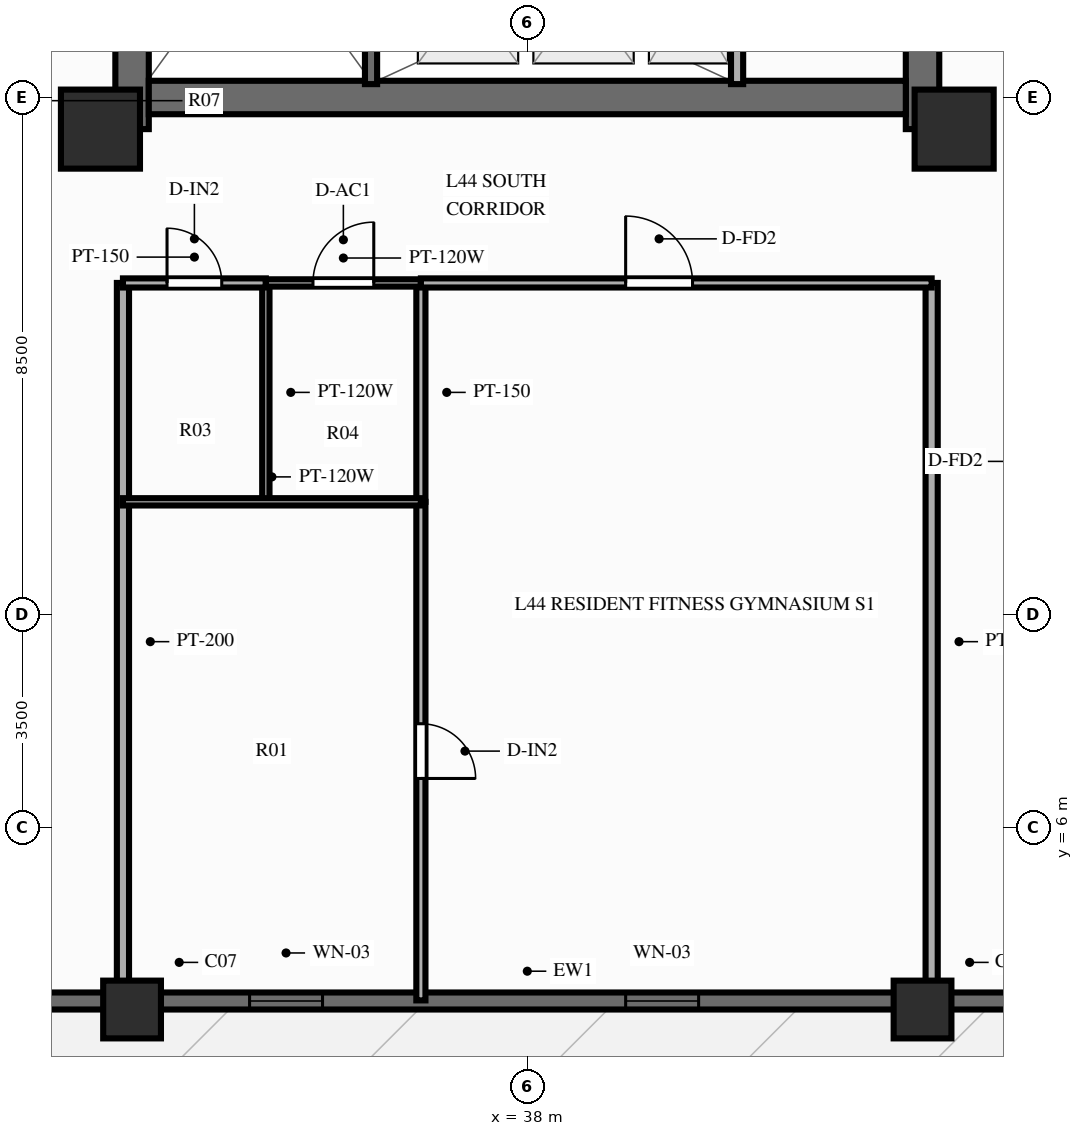
"""IFC4 building model, lengths in metres.
Left out: names, types, materials, properties, quantities, classifications, styles, units other than length and angle.
Written with IfcOpenShell. Run it as: python <this file> out.ifc"""

import sys

from ifc_helpers import new_model, si_unit, direction, frame, frame_2d, origin, origin_2d, place, context, subcontext, project, spatial, rectangle, extrude, source, transform, mapped, element, fill, save


model = new_model("IFC4")
c1 = context("Model", 3, precision=1e-05, world=origin(), true_north=direction((0.0, 1.0)))
c2 = subcontext(c1, "Body", "Model", "MODEL_VIEW")
j1 = project(units=[si_unit("LENGTHUNIT", "METRE"), si_unit("PLANEANGLEUNIT", "RADIAN")], contexts=[c1])
p1 = place(None, origin())
s1 = spatial("IfcSite", under=j1, at=p1, CompositionType="ELEMENT")
p2 = place(p1, origin())
s2 = spatial("IfcBuilding", under=s1, at=p2, CompositionType="ELEMENT")
p3 = place(p2, frame((0.0, 0.0, 138.75)))
s3 = spatial("IfcBuildingStorey", under=s2, at=p3, CompositionType="ELEMENT", Elevation=138.75)
p4 = place(p3, frame((31.5, 17.48, 0.0), z_axis=(0.0, 0.0, 1.0), x_axis=(0.0, 1.0, 0.0)))
e1 = element("IfcWall", 1, at=p4, inside=s3, PredefinedType="SHEAR", context=c2, shape_type="SweptSolid", body=[
    extrude(rectangle(XDim=19.04, YDim=0.55, at=frame_2d((9.52, 0.0))), origin(), (0.0, 0.0, 1.0), 3.0),
])
p5 = place(p4, frame((6.32, 0.0, 0.0)))
e2 = element("IfcOpeningElement", 2, at=p5, cuts=e1, PredefinedType="OPENING", context=c2, shape_type="SweptSolid", body=[
    extrude(rectangle(XDim=1.1, YDim=2.15, at=frame_2d((0.55, 1.075))), frame((0.0, 0.287, 0.0), z_axis=(0.0, -1.0, 0.0), x_axis=(1.0, 0.0, 0.0)), (0.0, 0.0, 1.0), 0.574),
])
p6 = place(p3, frame((44.5, 17.48, 0.0), z_axis=(0.0, 0.0, 1.0), x_axis=(0.0, 1.0, 0.0)))
e3 = element("IfcWall", 3, at=p6, inside=s3, PredefinedType="SHEAR", context=c2, shape_type="SweptSolid", body=[
    extrude(rectangle(XDim=19.04, YDim=0.55, at=frame_2d((9.52, 0.0))), origin(), (0.0, 0.0, 1.0), 3.0),
])
p7 = place(p6, frame((12.67, 0.0, 0.0), z_axis=(0.0, 0.0, 1.0), x_axis=(-1.0, 0.0, 0.0)))
e4 = element("IfcOpeningElement", 4, at=p7, cuts=e3, PredefinedType="OPENING", context=c2, shape_type="SweptSolid", body=[
    extrude(rectangle(XDim=1.1, YDim=2.15, at=frame_2d((0.55, 1.075))), frame((0.0, 0.287, 0.0), z_axis=(0.0, -1.0, 0.0), x_axis=(1.0, 0.0, 0.0)), (0.0, 0.0, 1.0), 0.574),
])
p8 = place(p3, frame((31.775, 18.0, 0.0), z_axis=(0.0, 0.0, 1.0), x_axis=(1.0, 0.0, 0.0)))
e5 = element("IfcWall", 5, at=p8, inside=s3, PredefinedType="SHEAR", context=c2, shape_type="SweptSolid", body=[
    extrude(rectangle(XDim=12.45, YDim=0.55, at=frame_2d((6.225, 0.0))), origin(), (0.0, 0.0, 1.0), 3.0),
])
m1 = source(origin(), c2, "Body", "SweptSolid", [
    extrude(rectangle(XDim=1.3, YDim=1.3, at=origin_2d()), origin(), (0.0, 0.0, 1.0), 3.0),
])
for number, where, z_axis, x_axis in (
    (6, (30.98, 17.48, 0.0), (0.0, 0.0, 1.0), (1.0, 0.0, 0.0)),
    (7, (45.02, 17.48, 0.0), (0.0, 0.0, 1.0), (1.0, 0.0, 0.0)),
):
    element("IfcColumn", number, at=place(p3, frame(where, z_axis=z_axis, x_axis=x_axis)), inside=s3, PredefinedType="COLUMN", context=c2, shape_type="MappedRepresentation", body=[
        mapped(m1, transform((0.0, 0.0, 0.0), scale=1.0)),
    ])
m2 = source(origin(), c2, "Body", "SweptSolid", [
    extrude(rectangle(XDim=0.95, YDim=0.95, at=origin_2d()), origin(), (0.0, 0.0, 1.0), 3.0),
])
for number, where, z_axis, x_axis in (
    (8, (31.5, 3.0, 0.0), (0.0, 0.0, 1.0), (1.0, 0.0, 0.0)),
    (9, (44.5, 3.0, 0.0), (0.0, 0.0, 1.0), (1.0, 0.0, 0.0)),
):
    element("IfcColumn", number, at=place(p3, frame(where, z_axis=z_axis, x_axis=x_axis)), inside=s3, PredefinedType="COLUMN", context=c2, shape_type="MappedRepresentation", body=[
        mapped(m2, transform((0.0, 0.0, 0.0), scale=1.0)),
    ])
p9 = place(p3, frame((16.2, 3.14, 0.0), z_axis=(0.0, 0.0, 1.0), x_axis=(1.0, 0.0, 0.0)))
e10 = element("IfcWall", 10, at=p9, inside=s3, PredefinedType="SOLIDWALL", context=c2, shape_type="SweptSolid", body=[
    extrude(rectangle(XDim=43.6, YDim=0.28, at=frame_2d((21.8, 0.0))), origin(), (0.0, 0.0, 1.0), 2.28),
])
p10 = place(p9, frame((8.2, 0.0, 0.0), z_axis=(0.0, 0.0, 1.0), x_axis=(-1.0, 0.0, 0.0)))
e11 = element("IfcOpeningElement", 11, at=p10, cuts=e10, PredefinedType="OPENING", context=c2, shape_type="SweptSolid", body=[
    extrude(rectangle(XDim=1.1, YDim=2.15, at=frame_2d((0.55, 1.075))), frame((0.0, 0.152, 0.0), z_axis=(0.0, -1.0, 0.0), x_axis=(1.0, 0.0, 0.0)), (0.0, 0.0, 1.0), 0.304),
])
p11 = place(p9, frame((17.232, 0.0, 0.25)))
e12 = element("IfcOpeningElement", 12, at=p11, cuts=e10, PredefinedType="OPENING", context=c2, shape_type="SweptSolid", body=[
    extrude(rectangle(XDim=1.2, YDim=1.5, at=frame_2d((0.6, 0.75))), frame((0.0, 0.152, 0.0), z_axis=(0.0, -1.0, 0.0), x_axis=(1.0, 0.0, 0.0)), (0.0, 0.0, 1.0), 0.304),
])
p12 = place(p9, frame((23.417, 0.0, 0.25)))
e13 = element("IfcOpeningElement", 13, at=p12, cuts=e10, PredefinedType="OPENING", context=c2, shape_type="SweptSolid", body=[
    extrude(rectangle(XDim=1.2, YDim=1.5, at=frame_2d((0.6, 0.75))), frame((0.0, 0.152, 0.0), z_axis=(0.0, -1.0, 0.0), x_axis=(1.0, 0.0, 0.0)), (0.0, 0.0, 1.0), 0.304),
])
p13 = place(p9, frame((35.35, 0.0, 0.25)))
e14 = element("IfcOpeningElement", 14, at=p13, cuts=e10, PredefinedType="OPENING", context=c2, shape_type="SweptSolid", body=[
    extrude(rectangle(XDim=1.2, YDim=1.5, at=frame_2d((0.6, 0.75))), frame((0.0, 0.152, 0.0), z_axis=(0.0, -1.0, 0.0), x_axis=(1.0, 0.0, 0.0)), (0.0, 0.0, 1.0), 0.304),
])
p14 = place(p3, frame((41.45, 18.22, 0.0), z_axis=(0.0, 0.0, 1.0), x_axis=(0.0, 1.0, 0.0)))
e15 = element("IfcWall", 15, at=p14, inside=s3, PredefinedType="PARTITIONING", context=c2, shape_type="SweptSolid", body=[
    extrude(rectangle(XDim=2.96, YDim=0.2, at=frame_2d((1.48, 0.0))), origin(), (0.0, 0.0, 1.0), 2.79),
])
p15 = place(p3, frame((35.43, 18.22, 0.0), z_axis=(0.0, 0.0, 1.0), x_axis=(0.0, 1.0, 0.0)))
e16 = element("IfcWall", 16, at=p15, inside=s3, PredefinedType="SOLIDWALL", context=c2, shape_type="SweptSolid", body=[
    extrude(rectangle(XDim=7.22, YDim=0.2, at=frame_2d((3.61, 0.0))), origin(), (0.0, 0.0, 1.0), 2.79),
])
p16 = place(p15, frame((6.68, 0.0, 0.0), z_axis=(0.0, 0.0, 1.0), x_axis=(-1.0, 0.0, 0.0)))
e17 = element("IfcOpeningElement", 17, at=p16, cuts=e16, PredefinedType="OPENING", context=c2, shape_type="SweptSolid", body=[
    extrude(rectangle(XDim=1.1, YDim=2.15, at=frame_2d((0.55, 1.075))), frame((0.0, 0.112, 0.0), z_axis=(0.0, -1.0, 0.0), x_axis=(1.0, 0.0, 0.0)), (0.0, 0.0, 1.0), 0.224),
])
for number, where, z_axis, x_axis in (
    (18, (31.35, 14.95, 0.0), (0.0, 0.0, 1.0), (0.0, -1.0, 0.0)),
    (19, (44.65, 14.95, 0.0), (0.0, 0.0, 1.0), (0.0, -1.0, 0.0)),
):
    element("IfcWall", number, at=place(p3, frame(where, z_axis=z_axis, x_axis=x_axis)), inside=s3, PredefinedType="PARTITIONING", context=c2, shape_type="SweptSolid", body=[
        extrude(rectangle(XDim=11.8, YDim=0.2, at=frame_2d((5.9, 0.0))), origin(), (0.0, 0.0, 1.0), 2.34),
    ])
p17 = place(p3, frame((33.7, 14.95, 0.0), z_axis=(0.0, 0.0, 1.0), x_axis=(0.0, -1.0, 0.0)))
e20 = element("IfcWall", 20, at=p17, inside=s3, PredefinedType="PARTITIONING", context=c2, shape_type="SweptSolid", body=[
    extrude(rectangle(XDim=3.6, YDim=0.12, at=frame_2d((1.8, 0.0))), origin(), (0.0, 0.0, 1.0), 2.79),
])
p18 = place(p3, frame((36.25, 14.95, 0.0), z_axis=(0.0, 0.0, 1.0), x_axis=(0.0, -1.0, 0.0)))
e21 = element("IfcWall", 21, at=p18, inside=s3, PredefinedType="PARTITIONING", context=c2, shape_type="SweptSolid", body=[
    extrude(rectangle(XDim=3.6, YDim=0.15, at=frame_2d((1.8, 0.0))), origin(), (0.0, 0.0, 1.0), 2.79),
])
p19 = place(p3, frame((36.25, 11.35, 0.0), z_axis=(0.0, 0.0, 1.0), x_axis=(0.0, -1.0, 0.0)))
e22 = element("IfcWall", 22, at=p19, inside=s3, PredefinedType="PARTITIONING", context=c2, shape_type="SweptSolid", body=[
    extrude(rectangle(XDim=8.2, YDim=0.15, at=frame_2d((4.1, 0.0))), origin(), (0.0, 0.0, 1.0), 2.79),
])
p20 = place(p19, frame((3.65, 0.0, 0.0)))
e23 = element("IfcOpeningElement", 23, at=p20, cuts=e22, PredefinedType="OPENING", context=c2, shape_type="SweptSolid", body=[
    extrude(rectangle(XDim=0.9, YDim=2.1, at=frame_2d((0.45, 1.05))), frame((0.0, 0.087, 0.0), z_axis=(0.0, -1.0, 0.0), x_axis=(1.0, 0.0, 0.0)), (0.0, 0.0, 1.0), 0.174),
])
p21 = place(p3, frame((31.35, 11.35, 0.0), z_axis=(0.0, 0.0, 1.0), x_axis=(1.0, 0.0, 0.0)))
e24 = element("IfcWall", 24, at=p21, inside=s3, PredefinedType="PARTITIONING", context=c2, shape_type="SweptSolid", body=[
    extrude(rectangle(XDim=4.9, YDim=0.12, at=frame_2d((2.45, 0.0))), origin(), (0.0, 0.0, 1.0), 2.79),
])
p22 = place(p3, frame((31.35, 14.95, 0.0), z_axis=(0.0, 0.0, 1.0), x_axis=(1.0, 0.0, 0.0)))
e25 = element("IfcWall", 25, at=p22, inside=s3, PredefinedType="PARTITIONING", context=c2, shape_type="SweptSolid", body=[
    extrude(rectangle(XDim=2.35, YDim=0.15, at=frame_2d((1.175, 0.0))), origin(), (0.0, 0.0, 1.0), 2.79),
])
p23 = place(p22, frame((0.725, 0.0, 0.0)))
e26 = element("IfcOpeningElement", 26, at=p23, cuts=e25, PredefinedType="OPENING", context=c2, shape_type="SweptSolid", body=[
    extrude(rectangle(XDim=0.9, YDim=2.1, at=frame_2d((0.45, 1.05))), frame((0.0, 0.087, 0.0), z_axis=(0.0, -1.0, 0.0), x_axis=(1.0, 0.0, 0.0)), (0.0, 0.0, 1.0), 0.174),
])
p24 = place(p3, frame((33.7, 14.95, 0.0), z_axis=(0.0, 0.0, 1.0), x_axis=(1.0, 0.0, 0.0)))
e27 = element("IfcWall", 27, at=p24, inside=s3, PredefinedType="PARTITIONING", context=c2, shape_type="SweptSolid", body=[
    extrude(rectangle(XDim=2.55, YDim=0.12, at=frame_2d((1.275, 0.0))), origin(), (0.0, 0.0, 1.0), 2.79),
])
p25 = place(p24, frame((0.775, 0.0, 0.0)))
e28 = element("IfcOpeningElement", 28, at=p25, cuts=e27, PredefinedType="OPENING", context=c2, shape_type="SweptSolid", body=[
    extrude(rectangle(XDim=1.0, YDim=2.1, at=frame_2d((0.5, 1.05))), frame((0.0, 0.072, 0.0), z_axis=(0.0, -1.0, 0.0), x_axis=(1.0, 0.0, 0.0)), (0.0, 0.0, 1.0), 0.144),
])
p26 = place(p3, frame((36.25, 14.95, 0.0), z_axis=(0.0, 0.0, 1.0), x_axis=(1.0, 0.0, 0.0)))
e29 = element("IfcWall", 29, at=p26, inside=s3, PredefinedType="PARTITIONING", context=c2, shape_type="SweptSolid", body=[
    extrude(rectangle(XDim=8.4, YDim=0.15, at=frame_2d((4.2, 0.0))), origin(), (0.0, 0.0, 1.0), 2.79),
])
p27 = place(p26, frame((3.367, 0.0, 0.0)))
e30 = element("IfcOpeningElement", 30, at=p27, cuts=e29, PredefinedType="OPENING", context=c2, shape_type="SweptSolid", body=[
    extrude(rectangle(XDim=1.1, YDim=2.15, at=frame_2d((0.55, 1.075))), frame((0.0, 0.087, 0.0), z_axis=(0.0, -1.0, 0.0), x_axis=(1.0, 0.0, 0.0)), (0.0, 0.0, 1.0), 0.174),
])
m3 = source(origin(), c2, "Body", "SweptSolid", [
    extrude(rectangle(XDim=1.2, YDim=1.5, at=frame_2d((0.6, 0.75))), frame((0.0, 0.03, 0.0), z_axis=(0.0, -1.0, 0.0), x_axis=(1.0, 0.0, 0.0)), (0.0, 0.0, 1.0), 0.06),
])
p28 = place(p11, origin())
e31 = element("IfcWindow", 31, at=p28, inside=s3, PartitioningType="SINGLE_PANEL", PredefinedType="WINDOW", context=c2, shape_type="MappedRepresentation", body=[
    mapped(m3, transform((0.0, 0.0, 0.0), scale=1.0)),
])
fill(e12, e31)
p29 = place(p12, origin())
e32 = element("IfcWindow", 32, at=p29, inside=s3, PartitioningType="SINGLE_PANEL", PredefinedType="WINDOW", context=c2, shape_type="MappedRepresentation", body=[
    mapped(m3, transform((0.0, 0.0, 0.0), scale=1.0)),
])
fill(e13, e32)
m4 = source(origin(), c2, "Body", "SweptSolid", [
    extrude(rectangle(XDim=0.9, YDim=2.1, at=frame_2d((0.45, 1.05))), frame((0.0, 0.025, 0.0), z_axis=(0.0, -1.0, 0.0), x_axis=(1.0, 0.0, 0.0)), (0.0, 0.0, 1.0), 0.05),
])
p30 = place(p20, origin())
e33 = element("IfcDoor", 33, at=p30, inside=s3, OperationType="SINGLE_SWING_RIGHT", PredefinedType="DOOR", context=c2, shape_type="MappedRepresentation", body=[
    mapped(m4, transform((0.0, 0.0, 0.0), scale=1.0)),
])
fill(e23, e33)
p31 = place(p23, origin())
e34 = element("IfcDoor", 34, at=p31, inside=s3, OperationType="SINGLE_SWING_LEFT", PredefinedType="DOOR", context=c2, shape_type="MappedRepresentation", body=[
    mapped(m4, transform((0.0, 0.0, 0.0), scale=1.0)),
])
fill(e26, e34)
m5 = source(origin(), c2, "Body", "SweptSolid", [
    extrude(rectangle(XDim=1.0, YDim=2.1, at=frame_2d((0.5, 1.05))), frame((0.0, 0.025, 0.0), z_axis=(0.0, -1.0, 0.0), x_axis=(1.0, 0.0, 0.0)), (0.0, 0.0, 1.0), 0.05),
])
p32 = place(p25, origin())
e35 = element("IfcDoor", 35, at=p32, inside=s3, OperationType="SINGLE_SWING_RIGHT", PredefinedType="DOOR", context=c2, shape_type="MappedRepresentation", body=[
    mapped(m5, transform((0.0, 0.0, 0.0), scale=1.0)),
])
fill(e28, e35)
m6 = source(origin(), c2, "Body", "SweptSolid", [
    extrude(rectangle(XDim=1.1, YDim=2.15, at=frame_2d((0.55, 1.075))), frame((0.0, 0.025, 0.0), z_axis=(0.0, -1.0, 0.0), x_axis=(1.0, 0.0, 0.0)), (0.0, 0.0, 1.0), 0.05),
])
p33 = place(p27, origin())
e36 = element("IfcDoor", 36, at=p33, inside=s3, OperationType="SINGLE_SWING_LEFT", PredefinedType="DOOR", context=c2, shape_type="MappedRepresentation", body=[
    mapped(m6, transform((0.0, 0.0, 0.0), scale=1.0)),
])
fill(e30, e36)
save(model, sys.argv[1])
